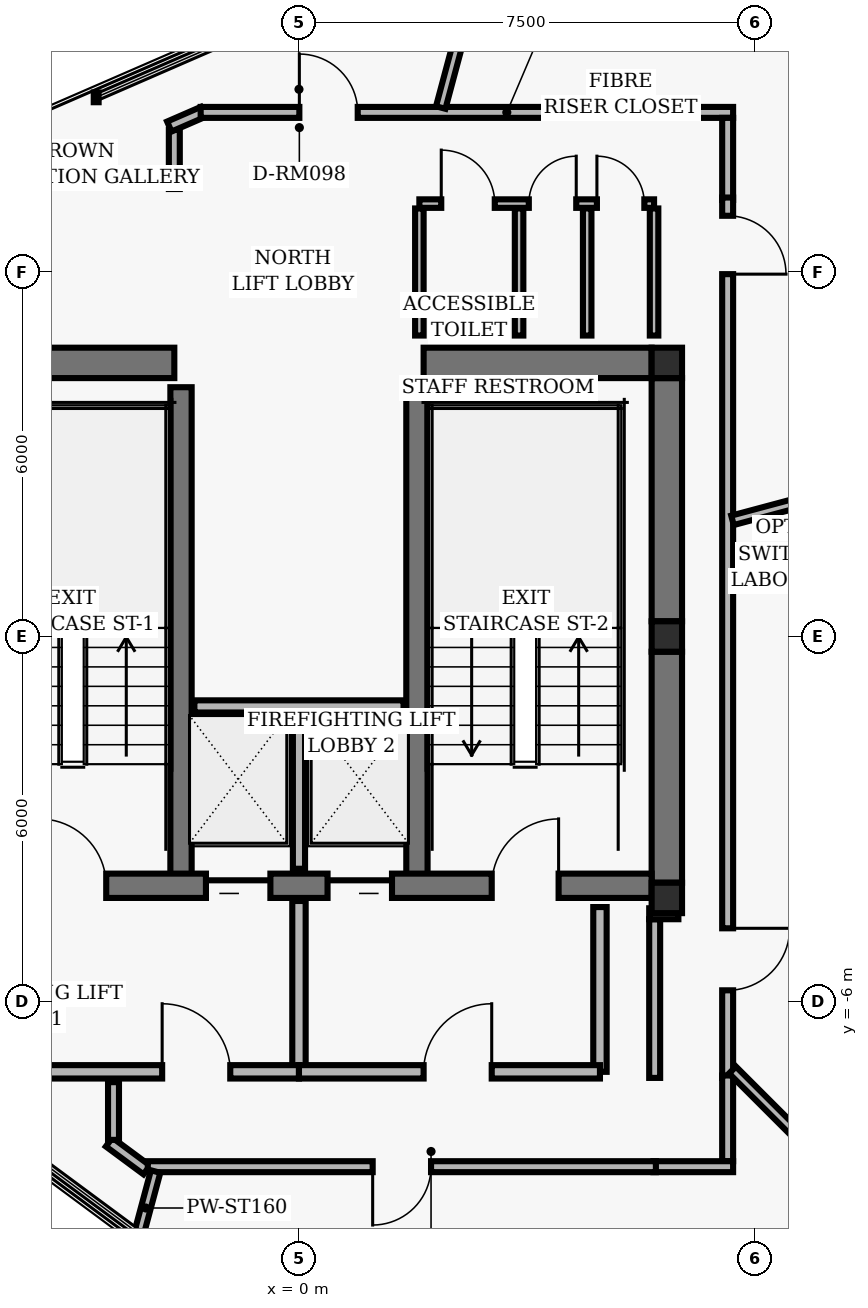
"""IFC4 building model, lengths in metres.
Left out: names, types, materials, properties, quantities, classifications, styles, units other than length and angle.
Written with IfcOpenShell. Run it as: python <this file> out.ifc"""

import sys

from ifc_helpers import new_model, si_unit, direction, frame, frame_2d, origin, origin_2d, place, context, subcontext, project, spatial, rectangle, hollow_rectangle, extrude, element, fill, save


model = new_model("IFC4")
c1 = context("Model", 3, precision=1e-05, world=origin(), true_north=direction((0.0, 1.0)))
c2 = subcontext(c1, "Body", "Model", "MODEL_VIEW")
j1 = project(units=[si_unit("LENGTHUNIT", "METRE"), si_unit("PLANEANGLEUNIT", "RADIAN")], contexts=[c1])
p1 = place(None, origin())
s1 = spatial("IfcSite", under=j1, at=p1, CompositionType="ELEMENT")
p2 = place(p1, origin())
s2 = spatial("IfcBuilding", under=s1, at=p2, CompositionType="ELEMENT")
p3 = place(p2, frame((0.0, 0.0, 243.36)))
s3 = spatial("IfcBuildingStorey", under=s2, at=p3, CompositionType="ELEMENT", Elevation=243.36)
for number, where, z_axis, x_axis in (
    (1, (6.05, 4.5, 0.0), (0.0, 0.0, 1.0), (1.0, 0.0, 0.0)),
    (2, (6.05, 0.0, 0.0), (0.0, 0.0, 1.0), (1.0, 0.0, 0.0)),
    (3, (6.05, -4.3, 0.0), (0.0, 0.0, 1.0), (1.0, 0.0, 0.0)),
):
    element("IfcColumn", number, at=place(p3, frame(where, z_axis=z_axis, x_axis=x_axis)), inside=s3, PredefinedType="COLUMN", context=c2, shape_type="SweptSolid", body=[
        extrude(hollow_rectangle(XDim=0.5, YDim=0.5, WallThickness=0.02, InnerFilletRadius=0.02, OuterFilletRadius=0.04, at=origin_2d()), origin(), (0.0, 0.0, 1.0), 2.88),
    ])
p4 = place(p3, frame((6.05, 0.25, 0.0), z_axis=(0.0, 0.0, 1.0), x_axis=(0.0, 1.0, 0.0)))
e4 = element("IfcWall", 4, at=p4, inside=s3, PredefinedType="SHEAR", context=c2, shape_type="SweptSolid", body=[
    extrude(rectangle(XDim=4.0, YDim=0.5, at=frame_2d((2.0, 0.0))), origin(), (0.0, 0.0, 1.0), 2.648),
])
p5 = place(p3, frame((6.05, -4.05, 0.0), z_axis=(0.0, 0.0, 1.0), x_axis=(0.0, 1.0, 0.0)))
e5 = element("IfcWall", 5, at=p5, inside=s3, PredefinedType="SHEAR", context=c2, shape_type="SweptSolid", body=[
    extrude(rectangle(XDim=3.8, YDim=0.5, at=frame_2d((1.9, 0.0))), origin(), (0.0, 0.0, 1.0), 2.648),
])
for number, where, z_axis, x_axis in (
    (6, (-1.94, -4.1, 0.0), (0.0, 0.0, 1.0), (0.0, 1.0, 0.0)),
    (7, (1.94, -4.1, 0.0), (0.0, 0.0, 1.0), (0.0, 1.0, 0.0)),
):
    element("IfcWall", number, at=place(p3, frame(where, z_axis=z_axis, x_axis=x_axis)), inside=s3, PredefinedType="SHEAR", context=c2, shape_type="SweptSolid", body=[
        extrude(rectangle(XDim=8.2, YDim=0.35, at=frame_2d((4.1, 0.0))), origin(), (0.0, 0.0, 1.0), 2.648),
    ])
p6 = place(p3, frame((-5.8, -4.1, 0.0), z_axis=(0.0, 0.0, 1.0), x_axis=(1.0, 0.0, 0.0)))
e8 = element("IfcWall", 8, at=p6, inside=s3, PredefinedType="SHEAR", context=c2, shape_type="SweptSolid", body=[
    extrude(rectangle(XDim=11.6, YDim=0.4, at=frame_2d((5.8, 0.0))), origin(), (0.0, 0.0, 1.0), 2.648),
])
p7 = place(p6, frame((1.53, 0.0, 0.0)))
e9 = element("IfcOpeningElement", 9, at=p7, cuts=e8, PredefinedType="OPENING", context=c2, shape_type="SweptSolid", body=[
    extrude(rectangle(XDim=1.1, YDim=2.04, at=frame_2d((0.55, 1.02))), frame((0.0, 0.21, 0.0), z_axis=(0.0, -1.0, 0.0), x_axis=(1.0, 0.0, 0.0)), (0.0, 0.0, 1.0), 0.42),
])
p8 = place(p6, frame((8.97, 0.0, 0.0)))
e10 = element("IfcOpeningElement", 10, at=p8, cuts=e8, PredefinedType="OPENING", context=c2, shape_type="SweptSolid", body=[
    extrude(rectangle(XDim=1.1, YDim=2.04, at=frame_2d((0.55, 1.02))), frame((0.0, 0.21, 0.0), z_axis=(0.0, -1.0, 0.0), x_axis=(1.0, 0.0, 0.0)), (0.0, 0.0, 1.0), 0.42),
])
p9 = place(p6, frame((4.27, 0.0, 0.0)))
e11 = element("IfcOpeningElement", 11, at=p9, cuts=e8, PredefinedType="OPENING", context=c2, shape_type="SweptSolid", body=[
    extrude(rectangle(XDim=1.06, YDim=2.04, at=frame_2d((0.53, 1.02))), frame((0.0, 0.21, 0.0), z_axis=(0.0, -1.0, 0.0), x_axis=(1.0, 0.0, 0.0)), (0.0, 0.0, 1.0), 0.42),
])
p10 = place(p6, frame((6.27, 0.0, 0.0)))
e12 = element("IfcOpeningElement", 12, at=p10, cuts=e8, PredefinedType="OPENING", context=c2, shape_type="SweptSolid", body=[
    extrude(rectangle(XDim=1.06, YDim=2.04, at=frame_2d((0.53, 1.02))), frame((0.0, 0.21, 0.0), z_axis=(0.0, -1.0, 0.0), x_axis=(1.0, 0.0, 0.0)), (0.0, 0.0, 1.0), 0.42),
])
for number, where, z_axis, x_axis in (
    (13, (-5.8, 4.5, 0.0), (0.0, 0.0, 1.0), (1.0, 0.0, 0.0)),
    (14, (2.05, 4.5, 0.0), (0.0, 0.0, 1.0), (1.0, 0.0, 0.0)),
):
    element("IfcWall", number, at=place(p3, frame(where, z_axis=z_axis, x_axis=x_axis)), inside=s3, PredefinedType="SHEAR", context=c2, shape_type="SweptSolid", body=[
        extrude(rectangle(XDim=3.75, YDim=0.5, at=frame_2d((1.875, 0.0))), origin(), (0.0, 0.0, 1.0), 2.648),
    ])
p11 = place(p3, frame((0.0, -3.82, 0.0), z_axis=(0.0, 0.0, 1.0), x_axis=(0.0, 1.0, 0.0)))
e15 = element("IfcWall", 15, at=p11, inside=s3, PredefinedType="PARTITIONING", context=c2, shape_type="SweptSolid", body=[
    extrude(rectangle(XDim=2.67, YDim=0.2, at=frame_2d((1.335, 0.0))), origin(), (0.0, 0.0, 1.0), 2.623),
])
p12 = place(p3, frame((-1.72, -1.15, 0.0), z_axis=(0.0, 0.0, 1.0), x_axis=(1.0, 0.0, 0.0)))
e16 = element("IfcWall", 16, at=p12, inside=s3, PredefinedType="PARTITIONING", context=c2, shape_type="SweptSolid", body=[
    extrude(rectangle(XDim=3.44, YDim=0.2, at=frame_2d((1.72, 0.0))), origin(), (0.0, 0.0, 1.0), 2.623),
])
p13 = place(p3, frame((4.95, -7.16, 0.0), z_axis=(0.0, 0.0, 1.0), x_axis=(0.0, 1.0, 0.0)))
e17 = element("IfcWall", 17, at=p13, inside=s3, PredefinedType="PARTITIONING", context=c2, shape_type="SweptSolid", body=[
    extrude(rectangle(XDim=2.71, YDim=0.22, at=frame_2d((1.355, 0.0))), origin(), (0.0, 0.0, 1.0), 2.623),
])
p14 = place(p3, frame((0.0, -7.16, 0.0), z_axis=(0.0, 0.0, 1.0), x_axis=(0.0, 1.0, 0.0)))
e18 = element("IfcWall", 18, at=p14, inside=s3, PredefinedType="PARTITIONING", context=c2, shape_type="SweptSolid", body=[
    extrude(rectangle(XDim=2.81, YDim=0.22, at=frame_2d((1.405, 0.0))), origin(), (0.0, 0.0, 1.0), 2.623),
])
p15 = place(p3, frame((-5.4, -7.16, 0.0), z_axis=(0.0, 0.0, 1.0), x_axis=(1.0, 0.0, 0.0)))
e19 = element("IfcWall", 19, at=p15, inside=s3, PredefinedType="PARTITIONING", context=c2, shape_type="SweptSolid", body=[
    extrude(rectangle(XDim=5.4, YDim=0.22, at=frame_2d((2.7, 0.0))), origin(), (0.0, 0.0, 1.0), 2.623),
])
p16 = place(p15, frame((3.15, 0.0, 0.0)))
e20 = element("IfcOpeningElement", 20, at=p16, cuts=e19, PredefinedType="OPENING", context=c2, shape_type="SweptSolid", body=[
    extrude(rectangle(XDim=1.12, YDim=2.02, at=frame_2d((0.56, 1.01))), frame((0.0, 0.12, 0.0), z_axis=(0.0, -1.0, 0.0), x_axis=(1.0, 0.0, 0.0)), (0.0, 0.0, 1.0), 0.24),
])
p17 = place(p3, frame((0.0, -7.16, 0.0), z_axis=(0.0, 0.0, 1.0), x_axis=(1.0, 0.0, 0.0)))
e21 = element("IfcWall", 21, at=p17, inside=s3, PredefinedType="PARTITIONING", context=c2, shape_type="SweptSolid", body=[
    extrude(rectangle(XDim=4.95, YDim=0.22, at=frame_2d((2.475, 0.0))), origin(), (0.0, 0.0, 1.0), 2.623),
])
p18 = place(p17, frame((2.05, 0.0, 0.0)))
e22 = element("IfcOpeningElement", 22, at=p18, cuts=e21, PredefinedType="OPENING", context=c2, shape_type="SweptSolid", body=[
    extrude(rectangle(XDim=1.12, YDim=2.02, at=frame_2d((0.56, 1.01))), frame((0.0, 0.12, 0.0), z_axis=(0.0, -1.0, 0.0), x_axis=(1.0, 0.0, 0.0)), (0.0, 0.0, 1.0), 0.24),
])
p19 = place(p3, frame((1.98, 4.95, 0.0), z_axis=(0.0, 0.0, 1.0), x_axis=(0.0, 1.0, 0.0)))
e23 = element("IfcWall", 23, at=p19, inside=s3, PredefinedType="PARTITIONING", context=c2, shape_type="SweptSolid", body=[
    extrude(rectangle(XDim=2.09, YDim=0.14, at=frame_2d((1.045, 0.0))), origin(), (0.0, 0.0, 1.0), 2.623),
])
p20 = place(p3, frame((5.84, 4.95, 0.0), z_axis=(0.0, 0.0, 1.0), x_axis=(0.0, 1.0, 0.0)))
e24 = element("IfcWall", 24, at=p20, inside=s3, PredefinedType="PARTITIONING", context=c2, shape_type="SweptSolid", body=[
    extrude(rectangle(XDim=2.09, YDim=0.14, at=frame_2d((1.045, 0.0))), origin(), (0.0, 0.0, 1.0), 2.153),
])
p21 = place(p3, frame((1.98, 7.12, 0.0), z_axis=(0.0, 0.0, 1.0), x_axis=(1.0, 0.0, 0.0)))
e25 = element("IfcWall", 25, at=p21, inside=s3, PredefinedType="PARTITIONING", context=c2, shape_type="SweptSolid", body=[
    extrude(rectangle(XDim=3.86, YDim=0.14, at=frame_2d((1.93, 0.0))), origin(), (0.0, 0.0, 1.0), 2.623),
])
p22 = place(p21, frame((0.36, 0.0, 0.0)))
e26 = element("IfcOpeningElement", 26, at=p22, cuts=e25, PredefinedType="OPENING", context=c2, shape_type="SweptSolid", body=[
    extrude(rectangle(XDim=0.88, YDim=2.02, at=frame_2d((0.44, 1.01))), frame((0.0, 0.08, 0.0), z_axis=(0.0, -1.0, 0.0), x_axis=(1.0, 0.0, 0.0)), (0.0, 0.0, 1.0), 0.16),
])
p23 = place(p21, frame((1.8, 0.0, 0.0)))
e27 = element("IfcOpeningElement", 27, at=p23, cuts=e25, PredefinedType="OPENING", context=c2, shape_type="SweptSolid", body=[
    extrude(rectangle(XDim=0.78, YDim=2.01, at=frame_2d((0.39, 1.005))), frame((0.0, 0.08, 0.0), z_axis=(0.0, -1.0, 0.0), x_axis=(1.0, 0.0, 0.0)), (0.0, 0.0, 1.0), 0.16),
])
p24 = place(p21, frame((2.92, 0.0, 0.0)))
e28 = element("IfcOpeningElement", 28, at=p24, cuts=e25, PredefinedType="OPENING", context=c2, shape_type="SweptSolid", body=[
    extrude(rectangle(XDim=0.78, YDim=2.01, at=frame_2d((0.39, 1.005))), frame((0.0, 0.08, 0.0), z_axis=(0.0, -1.0, 0.0), x_axis=(1.0, 0.0, 0.0)), (0.0, 0.0, 1.0), 0.16),
])
for number, where, z_axis, x_axis in (
    (29, (3.62, 4.95, 0.0), (0.0, 0.0, 1.0), (0.0, 1.0, 0.0)),
    (30, (4.74, 4.95, 0.0), (0.0, 0.0, 1.0), (0.0, 1.0, 0.0)),
):
    element("IfcWall", number, at=place(p3, frame(where, z_axis=z_axis, x_axis=x_axis)), inside=s3, PredefinedType="PARTITIONING", context=c2, shape_type="SweptSolid", body=[
        extrude(rectangle(XDim=2.09, YDim=0.14, at=frame_2d((1.045, 0.0))), origin(), (0.0, 0.0, 1.0), 2.623),
    ])
p25 = place(p3, frame((-2.503, -8.773, 0.0), z_axis=(0.0, 0.0, 1.0), x_axis=(-0.803978362095, 0.594658551845, 0.0)))
e31 = element("IfcWall", 31, at=p25, inside=s3, PredefinedType="PARTITIONING", context=c2, shape_type="SweptSolid", body=[
    extrude(rectangle(XDim=0.77, YDim=0.18, at=frame_2d((0.385, 0.0))), origin(), (0.0, 0.0, 1.0), 2.203),
])
p26 = place(p3, frame((-3.05, -8.279, 0.0), z_axis=(0.0, 0.0, 1.0), x_axis=(0.0, 1.0, 0.0)))
e32 = element("IfcWall", 32, at=p26, inside=s3, PredefinedType="PARTITIONING", context=c2, shape_type="SweptSolid", body=[
    extrude(rectangle(XDim=0.949, YDim=0.18, at=frame_2d((0.475, 0.0))), origin(), (0.0, 0.0, 1.0), 2.623),
])
p27 = place(p3, frame((5.85, -7.26, 0.0), z_axis=(0.0, 0.0, 1.0), x_axis=(0.0, 1.0, 0.0)))
e33 = element("IfcWall", 33, at=p27, inside=s3, PredefinedType="PARTITIONING", context=c2, shape_type="SweptSolid", body=[
    extrude(rectangle(XDim=2.61, YDim=0.18, at=frame_2d((1.305, 0.0))), origin(), (0.0, 0.0, 1.0), 2.153),
])
p28 = place(p3, frame((5.76, -4.56, 0.0), z_axis=(0.0, 0.0, 1.0), x_axis=(1.0, 0.0, 0.0)))
e34 = element("IfcWall", 34, at=p28, inside=s3, PredefinedType="PARTITIONING", context=c2, shape_type="SweptSolid", body=[
    extrude(rectangle(XDim=0.48, YDim=0.18, at=frame_2d((0.24, 0.0))), origin(), (0.0, 0.0, 1.0), 2.623),
])
p29 = place(p3, frame((-2.05, 7.36, 0.0), z_axis=(0.0, 0.0, 1.0), x_axis=(0.0, 1.0, 0.0)))
e35 = element("IfcWall", 35, at=p29, inside=s3, PredefinedType="PARTITIONING", context=c2, shape_type="SweptSolid", body=[
    extrude(rectangle(XDim=0.973, YDim=0.18, at=frame_2d((0.486, 0.0))), origin(), (0.0, 0.0, 1.0), 2.623),
])
p30 = place(p3, frame((-2.133, 8.387, 0.0), z_axis=(0.0, 0.0, 1.0), x_axis=(0.917063633355, 0.398740883754, 0.0)))
e36 = element("IfcWall", 36, at=p30, inside=s3, PredefinedType="PARTITIONING", context=c2, shape_type="SweptSolid", body=[
    extrude(rectangle(XDim=0.604, YDim=0.18, at=frame_2d((0.302, 0.0))), origin(), (0.0, 0.0, 1.0), 2.203),
])
p31 = place(p3, frame((-1.617, 8.62, 0.0), z_axis=(0.0, 0.0, 1.0), x_axis=(1.0, 0.0, 0.0)))
e37 = element("IfcWall", 37, at=p31, inside=s3, PredefinedType="PARTITIONING", context=c2, shape_type="SweptSolid", body=[
    extrude(rectangle(XDim=7.487, YDim=0.18, at=frame_2d((3.743, 0.0))), origin(), (0.0, 0.0, 1.0), 2.623),
])
p32 = place(p31, frame((1.623, 0.0, 0.0)))
e38 = element("IfcOpeningElement", 38, at=p32, cuts=e37, PredefinedType="OPENING", context=c2, shape_type="SweptSolid", body=[
    extrude(rectangle(XDim=0.96, YDim=2.02, at=frame_2d((0.48, 1.01))), frame((0.0, 0.1, 0.0), z_axis=(0.0, -1.0, 0.0), x_axis=(1.0, 0.0, 0.0)), (0.0, 0.0, 1.0), 0.2),
])
p33 = place(p3, frame((5.83, 8.62, 0.0), z_axis=(0.0, 0.0, 1.0), x_axis=(1.0, 0.0, 0.0)))
e39 = element("IfcWall", 39, at=p33, inside=s3, PredefinedType="PARTITIONING", context=c2, shape_type="SweptSolid", body=[
    extrude(rectangle(XDim=1.31, YDim=0.18, at=frame_2d((0.655, 0.0))), origin(), (0.0, 0.0, 1.0), 2.623),
])
p34 = place(p3, frame((7.05, 8.53, 0.0), z_axis=(0.0, 0.0, 1.0), x_axis=(0.0, -1.0, 0.0)))
e40 = element("IfcWall", 40, at=p34, inside=s3, PredefinedType="PARTITIONING", context=c2, shape_type="SweptSolid", body=[
    extrude(rectangle(XDim=1.35, YDim=0.18, at=frame_2d((0.675, 0.0))), origin(), (0.0, 0.0, 1.0), 2.623),
])
p35 = place(p3, frame((7.05, 7.22, 0.0), z_axis=(0.0, 0.0, 1.0), x_axis=(0.0, -1.0, 0.0)))
e41 = element("IfcWall", 41, at=p35, inside=s3, PredefinedType="PARTITIONING", context=c2, shape_type="SweptSolid", body=[
    extrude(rectangle(XDim=14.48, YDim=0.18, at=frame_2d((7.24, 0.0))), origin(), (0.0, 0.0, 1.0), 2.203),
])
p36 = place(p35, frame((12.019, 0.0, 0.0)))
e42 = element("IfcOpeningElement", 42, at=p36, cuts=e41, PredefinedType="OPENING", context=c2, shape_type="SweptSolid", body=[
    extrude(rectangle(XDim=1.02, YDim=2.02, at=frame_2d((0.51, 1.01))), frame((0.0, 0.1, 0.0), z_axis=(0.0, -1.0, 0.0), x_axis=(1.0, 0.0, 0.0)), (0.0, 0.0, 1.0), 0.2),
])
p37 = place(p35, frame((0.3, 0.0, 0.0)))
e43 = element("IfcOpeningElement", 43, at=p37, cuts=e41, PredefinedType="OPENING", context=c2, shape_type="SweptSolid", body=[
    extrude(rectangle(XDim=0.96, YDim=2.02, at=frame_2d((0.48, 1.01))), frame((0.0, 0.1, 0.0), z_axis=(0.0, -1.0, 0.0), x_axis=(1.0, 0.0, 0.0)), (0.0, 0.0, 1.0), 0.2),
])
p38 = place(p3, frame((7.05, -7.22, 0.0), z_axis=(0.0, 0.0, 1.0), x_axis=(0.0, -1.0, 0.0)))
e44 = element("IfcWall", 44, at=p38, inside=s3, PredefinedType="PARTITIONING", context=c2, shape_type="SweptSolid", body=[
    extrude(rectangle(XDim=1.41, YDim=0.18, at=frame_2d((0.705, 0.0))), origin(), (0.0, 0.0, 1.0), 2.153),
])
p39 = place(p3, frame((7.14, -8.72, 0.0), z_axis=(0.0, 0.0, 1.0), x_axis=(-1.0, 0.0, 0.0)))
e45 = element("IfcWall", 45, at=p39, inside=s3, PredefinedType="PARTITIONING", context=c2, shape_type="SweptSolid", body=[
    extrude(rectangle(XDim=1.31, YDim=0.18, at=frame_2d((0.655, 0.0))), origin(), (0.0, 0.0, 1.0), 2.623),
])
p40 = place(p3, frame((5.87, -8.72, 0.0), z_axis=(0.0, 0.0, 1.0), x_axis=(-1.0, 0.0, 0.0)))
e46 = element("IfcWall", 46, at=p40, inside=s3, PredefinedType="PARTITIONING", context=c2, shape_type="SweptSolid", body=[
    extrude(rectangle(XDim=8.356, YDim=0.18, at=frame_2d((4.178, 0.0))), origin(), (0.0, 0.0, 1.0), 2.623),
])
p41 = place(p40, frame((3.698, 0.0, 0.0)))
e47 = element("IfcOpeningElement", 47, at=p41, cuts=e46, PredefinedType="OPENING", context=c2, shape_type="SweptSolid", body=[
    extrude(rectangle(XDim=0.96, YDim=2.02, at=frame_2d((0.48, 1.01))), frame((0.0, 0.1, 0.0), z_axis=(0.0, -1.0, 0.0), x_axis=(1.0, 0.0, 0.0)), (0.0, 0.0, 1.0), 0.2),
])
p42 = place(p3, frame((-2.358, -8.8, 0.0), z_axis=(0.0, 0.0, 1.0), x_axis=(-0.258739361089, -0.965947174034, 0.0)))
e48 = element("IfcWall", 48, at=p42, inside=s3, PredefinedType="PARTITIONING", context=c2, shape_type="SweptSolid", body=[
    extrude(rectangle(XDim=1.242, YDim=0.16, at=frame_2d((0.621, 0.0))), origin(), (0.0, 0.0, 1.0), 2.623),
])
p43 = place(p3, frame((7.13, -7.13, 0.0), z_axis=(0.0, 0.0, 1.0), x_axis=(0.707106781187, -0.707106781187, 0.0)))
e49 = element("IfcWall", 49, at=p43, inside=s3, PredefinedType="PARTITIONING", context=c2, shape_type="SweptSolid", body=[
    extrude(rectangle(XDim=2.224, YDim=0.16, at=frame_2d((1.112, 0.0))), origin(), (0.0, 0.0, 1.0), 2.623),
])
p44 = place(p3, frame((7.13, 1.91, 0.0), z_axis=(0.0, 0.0, 1.0), x_axis=(0.965935580448, 0.258782639342, 0.0)))
e50 = element("IfcWall", 50, at=p44, inside=s3, PredefinedType="PARTITIONING", context=c2, shape_type="SweptSolid", body=[
    extrude(rectangle(XDim=2.971, YDim=0.16, at=frame_2d((1.485, 0.0))), origin(), (0.0, 0.0, 1.0), 2.623),
])
p45 = place(p3, frame((2.331, 8.7, 0.0), z_axis=(0.0, 0.0, 1.0), x_axis=(0.258776761059, 0.965937155273, 0.0)))
e51 = element("IfcWall", 51, at=p45, inside=s3, PredefinedType="PARTITIONING", context=c2, shape_type="SweptSolid", body=[
    extrude(rectangle(XDim=3.3, YDim=0.16, at=frame_2d((1.65, 0.0))), origin(), (0.0, 0.0, 1.0), 2.623),
])
p46 = place(p7, origin())
e52 = element("IfcDoor", 52, at=p46, inside=s3, OperationType="SINGLE_SWING_LEFT", PredefinedType="DOOR", context=c2, shape_type="SweptSolid", body=[
    extrude(rectangle(XDim=1.1, YDim=2.04, at=frame_2d((0.55, 1.02))), frame((0.0, 0.025, 0.0), z_axis=(0.0, -1.0, 0.0), x_axis=(1.0, 0.0, 0.0)), (0.0, 0.0, 1.0), 0.05),
])
fill(e9, e52)
p47 = place(p8, origin())
e53 = element("IfcDoor", 53, at=p47, inside=s3, OperationType="SINGLE_SWING_RIGHT", PredefinedType="DOOR", context=c2, shape_type="SweptSolid", body=[
    extrude(rectangle(XDim=1.1, YDim=2.04, at=frame_2d((0.55, 1.02))), frame((0.0, 0.025, 0.0), z_axis=(0.0, -1.0, 0.0), x_axis=(1.0, 0.0, 0.0)), (0.0, 0.0, 1.0), 0.05),
])
fill(e10, e53)
p48 = place(p9, origin())
e54 = element("IfcDoor", 54, at=p48, inside=s3, OperationType="SLIDING_TO_LEFT", PredefinedType="DOOR", context=c2, shape_type="SweptSolid", body=[
    extrude(rectangle(XDim=1.06, YDim=2.04, at=frame_2d((0.53, 1.02))), frame((0.0, 0.025, 0.0), z_axis=(0.0, -1.0, 0.0), x_axis=(1.0, 0.0, 0.0)), (0.0, 0.0, 1.0), 0.05),
])
fill(e11, e54)
p49 = place(p10, origin())
e55 = element("IfcDoor", 55, at=p49, inside=s3, OperationType="SLIDING_TO_RIGHT", PredefinedType="DOOR", context=c2, shape_type="SweptSolid", body=[
    extrude(rectangle(XDim=1.06, YDim=2.04, at=frame_2d((0.53, 1.02))), frame((0.0, 0.025, 0.0), z_axis=(0.0, -1.0, 0.0), x_axis=(1.0, 0.0, 0.0)), (0.0, 0.0, 1.0), 0.05),
])
fill(e12, e55)
p50 = place(p16, origin())
e56 = element("IfcDoor", 56, at=p50, inside=s3, OperationType="SINGLE_SWING_LEFT", PredefinedType="DOOR", context=c2, shape_type="SweptSolid", body=[
    extrude(rectangle(XDim=1.12, YDim=2.02, at=frame_2d((0.56, 1.01))), frame((0.0, 0.025, 0.0), z_axis=(0.0, -1.0, 0.0), x_axis=(1.0, 0.0, 0.0)), (0.0, 0.0, 1.0), 0.05),
])
fill(e20, e56)
p51 = place(p18, origin())
e57 = element("IfcDoor", 57, at=p51, inside=s3, OperationType="SINGLE_SWING_RIGHT", PredefinedType="DOOR", context=c2, shape_type="SweptSolid", body=[
    extrude(rectangle(XDim=1.12, YDim=2.02, at=frame_2d((0.56, 1.01))), frame((0.0, 0.025, 0.0), z_axis=(0.0, -1.0, 0.0), x_axis=(1.0, 0.0, 0.0)), (0.0, 0.0, 1.0), 0.05),
])
fill(e22, e57)
p52 = place(p22, origin())
e58 = element("IfcDoor", 58, at=p52, inside=s3, OperationType="SINGLE_SWING_LEFT", PredefinedType="DOOR", context=c2, shape_type="SweptSolid", body=[
    extrude(rectangle(XDim=0.88, YDim=2.02, at=frame_2d((0.44, 1.01))), frame((0.0, 0.025, 0.0), z_axis=(0.0, -1.0, 0.0), x_axis=(1.0, 0.0, 0.0)), (0.0, 0.0, 1.0), 0.05),
])
fill(e26, e58)
p53 = place(p23, origin())
e59 = element("IfcDoor", 59, at=p53, inside=s3, OperationType="SINGLE_SWING_RIGHT", PredefinedType="DOOR", context=c2, shape_type="SweptSolid", body=[
    extrude(rectangle(XDim=0.78, YDim=2.01, at=frame_2d((0.39, 1.005))), frame((0.0, 0.025, 0.0), z_axis=(0.0, -1.0, 0.0), x_axis=(1.0, 0.0, 0.0)), (0.0, 0.0, 1.0), 0.05),
])
fill(e27, e59)
p54 = place(p24, origin())
e60 = element("IfcDoor", 60, at=p54, inside=s3, OperationType="SINGLE_SWING_LEFT", PredefinedType="DOOR", context=c2, shape_type="SweptSolid", body=[
    extrude(rectangle(XDim=0.78, YDim=2.01, at=frame_2d((0.39, 1.005))), frame((0.0, 0.025, 0.0), z_axis=(0.0, -1.0, 0.0), x_axis=(1.0, 0.0, 0.0)), (0.0, 0.0, 1.0), 0.05),
])
fill(e28, e60)
p55 = place(p41, origin())
e61 = element("IfcDoor", 61, at=p55, inside=s3, OperationType="SINGLE_SWING_RIGHT", PredefinedType="DOOR", context=c2, shape_type="SweptSolid", body=[
    extrude(rectangle(XDim=0.96, YDim=2.02, at=frame_2d((0.48, 1.01))), frame((0.0, 0.025, 0.0), z_axis=(0.0, -1.0, 0.0), x_axis=(1.0, 0.0, 0.0)), (0.0, 0.0, 1.0), 0.05),
])
fill(e47, e61)
p56 = place(p36, origin())
e62 = element("IfcDoor", 62, at=p56, inside=s3, OperationType="SINGLE_SWING_LEFT", PredefinedType="DOOR", context=c2, shape_type="SweptSolid", body=[
    extrude(rectangle(XDim=1.02, YDim=2.02, at=frame_2d((0.51, 1.01))), frame((0.0, 0.025, 0.0), z_axis=(0.0, -1.0, 0.0), x_axis=(1.0, 0.0, 0.0)), (0.0, 0.0, 1.0), 0.05),
])
fill(e42, e62)
p57 = place(p37, origin())
e63 = element("IfcDoor", 63, at=p57, inside=s3, OperationType="SINGLE_SWING_RIGHT", PredefinedType="DOOR", context=c2, shape_type="SweptSolid", body=[
    extrude(rectangle(XDim=0.96, YDim=2.02, at=frame_2d((0.48, 1.01))), frame((0.0, 0.025, 0.0), z_axis=(0.0, -1.0, 0.0), x_axis=(1.0, 0.0, 0.0)), (0.0, 0.0, 1.0), 0.05),
])
fill(e43, e63)
p58 = place(p32, origin())
e64 = element("IfcDoor", 64, at=p58, inside=s3, OperationType="SINGLE_SWING_LEFT", PredefinedType="DOOR", context=c2, shape_type="SweptSolid", body=[
    extrude(rectangle(XDim=0.96, YDim=2.02, at=frame_2d((0.48, 1.01))), frame((0.0, 0.025, 0.0), z_axis=(0.0, -1.0, 0.0), x_axis=(1.0, 0.0, 0.0)), (0.0, 0.0, 1.0), 0.05),
])
fill(e38, e64)
save(model, sys.argv[1])
